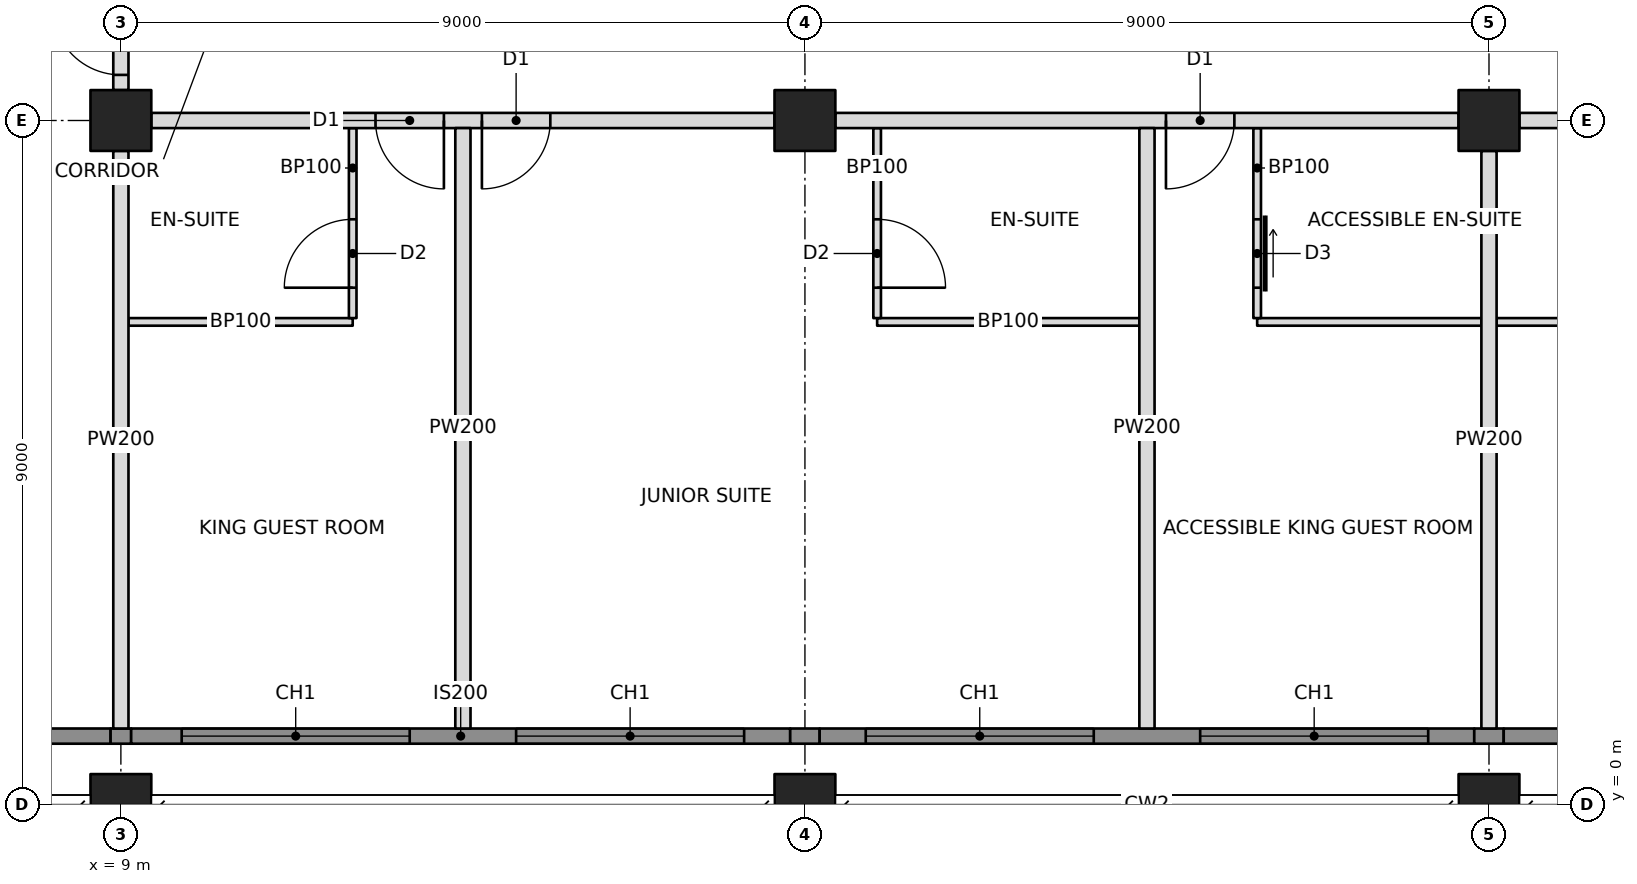
"""IFC4 building model, lengths in metres.
Left out: names, types, materials, properties, quantities, classifications, styles, units other than length and angle.
Written with IfcOpenShell. Run it as: python <this file> out.ifc"""

import sys

from ifc_helpers import new_model, si_unit, direction, frame, frame_2d, origin, origin_2d, place, context, subcontext, project, spatial, rectangle, hollow_rectangle, extrude, element, fill, save


model = new_model("IFC4")
c1 = context("Model", 3, precision=1e-05, world=origin(), true_north=direction((0.0, 1.0)))
c2 = subcontext(c1, "Body", "Model", "MODEL_VIEW")
j1 = project(units=[si_unit("LENGTHUNIT", "METRE"), si_unit("PLANEANGLEUNIT", "RADIAN")], contexts=[c1])
p1 = place(None, origin())
s1 = spatial("IfcSite", under=j1, at=p1, CompositionType="ELEMENT")
p2 = place(p1, origin())
s2 = spatial("IfcBuilding", under=s1, at=p2, CompositionType="ELEMENT")
p3 = place(p2, frame((0.0, 0.0, 233.8)))
s3 = spatial("IfcBuildingStorey", under=s2, at=p3, CompositionType="ELEMENT", Elevation=233.8)
p4 = place(p3, frame((9.0, 0.0, 0.0), z_axis=(0.0, 0.0, 1.0), x_axis=(1.0, 0.0, 0.0)))
e1 = element("IfcColumn", 1, at=p4, inside=s3, PredefinedType="COLUMN", context=c2, shape_type="SweptSolid", body=[
    extrude(hollow_rectangle(XDim=0.8, YDim=0.8, WallThickness=0.05, at=origin_2d()), origin(), (0.0, 0.0, 1.0), 3.6),
])
p5 = place(p3, frame((9.0, 9.0, 0.0), z_axis=(0.0, 0.0, 1.0), x_axis=(1.0, 0.0, 0.0)))
e2 = element("IfcColumn", 2, at=p5, inside=s3, PredefinedType="COLUMN", context=c2, shape_type="SweptSolid", body=[
    extrude(hollow_rectangle(XDim=0.8, YDim=0.8, WallThickness=0.04, at=origin_2d()), origin(), (0.0, 0.0, 1.0), 3.6),
])
p6 = place(p3, frame((18.0, 0.0, 0.0), z_axis=(0.0, 0.0, 1.0), x_axis=(1.0, 0.0, 0.0)))
e3 = element("IfcColumn", 3, at=p6, inside=s3, PredefinedType="COLUMN", context=c2, shape_type="SweptSolid", body=[
    extrude(hollow_rectangle(XDim=0.8, YDim=0.8, WallThickness=0.05, at=origin_2d()), origin(), (0.0, 0.0, 1.0), 3.6),
])
p7 = place(p3, frame((18.0, 9.0, 0.0), z_axis=(0.0, 0.0, 1.0), x_axis=(1.0, 0.0, 0.0)))
e4 = element("IfcColumn", 4, at=p7, inside=s3, PredefinedType="COLUMN", context=c2, shape_type="SweptSolid", body=[
    extrude(hollow_rectangle(XDim=0.8, YDim=0.8, WallThickness=0.04, at=origin_2d()), origin(), (0.0, 0.0, 1.0), 3.6),
])
p8 = place(p3, frame((27.0, 0.0, 0.0), z_axis=(0.0, 0.0, 1.0), x_axis=(1.0, 0.0, 0.0)))
e5 = element("IfcColumn", 5, at=p8, inside=s3, PredefinedType="COLUMN", context=c2, shape_type="SweptSolid", body=[
    extrude(hollow_rectangle(XDim=0.8, YDim=0.8, WallThickness=0.05, at=origin_2d()), origin(), (0.0, 0.0, 1.0), 3.6),
])
p9 = place(p3, frame((27.0, 9.0, 0.0), z_axis=(0.0, 0.0, 1.0), x_axis=(1.0, 0.0, 0.0)))
e6 = element("IfcColumn", 6, at=p9, inside=s3, PredefinedType="COLUMN", context=c2, shape_type="SweptSolid", body=[
    extrude(hollow_rectangle(XDim=0.8, YDim=0.8, WallThickness=0.04, at=origin_2d()), origin(), (0.0, 0.0, 1.0), 3.6),
])
p10 = place(p3, frame((3.0, 0.9, 0.0), z_axis=(0.0, 0.0, 1.0), x_axis=(1.0, 0.0, 0.0)))
e7 = element("IfcWall", 7, at=p10, inside=s3, PredefinedType="SOLIDWALL", context=c2, shape_type="SweptSolid", body=[
    extrude(rectangle(XDim=5.865, YDim=0.2, at=frame_2d((2.932, 0.0))), origin(), (0.0, 0.0, 1.0), 3.4),
])
p11 = place(p10, frame((1.45, 0.0, 0.6)))
e8 = element("IfcOpeningElement", 8, at=p11, cuts=e7, PredefinedType="OPENING", context=c2, shape_type="SweptSolid", body=[
    extrude(rectangle(XDim=3.0, YDim=2.2, at=frame_2d((1.5, 1.1))), frame((0.0, 0.11, 0.0), z_axis=(0.0, -1.0, 0.0), x_axis=(1.0, 0.0, 0.0)), (0.0, 0.0, 1.0), 0.22),
])
p12 = place(p3, frame((9.4, 9.0, 0.0), z_axis=(0.0, 0.0, 1.0), x_axis=(1.0, 0.0, 0.0)))
e9 = element("IfcWall", 9, at=p12, inside=s3, PredefinedType="PARTITIONING", context=c2, shape_type="SweptSolid", body=[
    extrude(rectangle(XDim=8.2, YDim=0.2, at=frame_2d((4.1, 0.0))), origin(), (0.0, 0.0, 1.0), 2.605),
])
p13 = place(p12, frame((2.95, 0.0, 0.0)))
e10 = element("IfcOpeningElement", 10, at=p13, cuts=e9, PredefinedType="OPENING", context=c2, shape_type="SweptSolid", body=[
    extrude(rectangle(XDim=0.9, YDim=2.1, at=frame_2d((0.45, 1.05))), frame((0.0, 0.11, 0.0), z_axis=(0.0, -1.0, 0.0), x_axis=(1.0, 0.0, 0.0)), (0.0, 0.0, 1.0), 0.22),
])
p14 = place(p12, frame((4.35, 0.0, 0.0)))
e11 = element("IfcOpeningElement", 11, at=p14, cuts=e9, PredefinedType="OPENING", context=c2, shape_type="SweptSolid", body=[
    extrude(rectangle(XDim=0.9, YDim=2.1, at=frame_2d((0.45, 1.05))), frame((0.0, 0.11, 0.0), z_axis=(0.0, -1.0, 0.0), x_axis=(1.0, 0.0, 0.0)), (0.0, 0.0, 1.0), 0.22),
])
p15 = place(p3, frame((18.4, 9.0, 0.0), z_axis=(0.0, 0.0, 1.0), x_axis=(1.0, 0.0, 0.0)))
e12 = element("IfcWall", 12, at=p15, inside=s3, PredefinedType="PARTITIONING", context=c2, shape_type="SweptSolid", body=[
    extrude(rectangle(XDim=8.2, YDim=0.2, at=frame_2d((4.1, 0.0))), origin(), (0.0, 0.0, 1.0), 2.605),
])
p16 = place(p15, frame((4.35, 0.0, 0.0)))
e13 = element("IfcOpeningElement", 13, at=p16, cuts=e12, PredefinedType="OPENING", context=c2, shape_type="SweptSolid", body=[
    extrude(rectangle(XDim=0.9, YDim=2.1, at=frame_2d((0.45, 1.05))), frame((0.0, 0.11, 0.0), z_axis=(0.0, -1.0, 0.0), x_axis=(1.0, 0.0, 0.0)), (0.0, 0.0, 1.0), 0.22),
])
p17 = place(p3, frame((27.4, 9.0, 0.0), z_axis=(0.0, 0.0, 1.0), x_axis=(1.0, 0.0, 0.0)))
e14 = element("IfcWall", 14, at=p17, inside=s3, PredefinedType="PARTITIONING", context=c2, shape_type="SweptSolid", body=[
    extrude(rectangle(XDim=8.368, YDim=0.2, at=frame_2d((4.184, 0.0))), origin(), (0.0, 0.0, 1.0), 2.605),
])
p18 = place(p17, frame((7.25, 0.0, 0.0)))
e15 = element("IfcOpeningElement", 15, at=p18, cuts=e14, PredefinedType="OPENING", context=c2, shape_type="SweptSolid", body=[
    extrude(rectangle(XDim=0.9, YDim=2.1, at=frame_2d((0.45, 1.05))), frame((0.0, 0.11, 0.0), z_axis=(0.0, -1.0, 0.0), x_axis=(1.0, 0.0, 0.0)), (0.0, 0.0, 1.0), 0.22),
])
p19 = place(p3, frame((9.0, 8.6, 0.0), z_axis=(0.0, 0.0, 1.0), x_axis=(0.0, -1.0, 0.0)))
e16 = element("IfcWall", 16, at=p19, inside=s3, PredefinedType="PARTITIONING", context=c2, shape_type="SweptSolid", body=[
    extrude(rectangle(XDim=7.6, YDim=0.2, at=frame_2d((3.8, 0.0))), origin(), (0.0, 0.0, 1.0), 2.638),
])
for number, where, z_axis, x_axis in (
    (17, (13.5, 8.9, 0.0), (0.0, 0.0, 1.0), (0.0, -1.0, 0.0)),
    (18, (22.5, 8.9, 0.0), (0.0, 0.0, 1.0), (0.0, -1.0, 0.0)),
):
    element("IfcWall", number, at=place(p3, frame(where, z_axis=z_axis, x_axis=x_axis)), inside=s3, PredefinedType="PARTITIONING", context=c2, shape_type="SweptSolid", body=[
        extrude(rectangle(XDim=7.9, YDim=0.2, at=frame_2d((3.95, 0.0))), origin(), (0.0, 0.0, 1.0), 2.604),
    ])
p20 = place(p3, frame((27.0, 8.6, 0.0), z_axis=(0.0, 0.0, 1.0), x_axis=(0.0, -1.0, 0.0)))
e19 = element("IfcWall", 19, at=p20, inside=s3, PredefinedType="PARTITIONING", context=c2, shape_type="SweptSolid", body=[
    extrude(rectangle(XDim=7.6, YDim=0.2, at=frame_2d((3.8, 0.0))), origin(), (0.0, 0.0, 1.0), 2.605),
])
p21 = place(p3, frame((9.1, 6.35, 0.0), z_axis=(0.0, 0.0, 1.0), x_axis=(1.0, 0.0, 0.0)))
e20 = element("IfcWall", 20, at=p21, inside=s3, PredefinedType="PARTITIONING", context=c2, shape_type="SweptSolid", body=[
    extrude(rectangle(XDim=2.95, YDim=0.1, at=frame_2d((1.475, 0.0))), origin(), (0.0, 0.0, 1.0), 2.638),
])
p22 = place(p3, frame((12.05, 8.9, 0.0), z_axis=(0.0, 0.0, 1.0), x_axis=(0.0, -1.0, 0.0)))
e21 = element("IfcWall", 21, at=p22, inside=s3, PredefinedType="PARTITIONING", context=c2, shape_type="SweptSolid", body=[
    extrude(rectangle(XDim=2.5, YDim=0.1, at=frame_2d((1.25, 0.0))), origin(), (0.0, 0.0, 1.0), 2.604),
])
p23 = place(p22, frame((1.2, 0.0, 0.0)))
e22 = element("IfcOpeningElement", 22, at=p23, cuts=e21, PredefinedType="OPENING", context=c2, shape_type="SweptSolid", body=[
    extrude(rectangle(XDim=0.9, YDim=2.1, at=frame_2d((0.45, 1.05))), frame((0.0, 0.06, 0.0), z_axis=(0.0, -1.0, 0.0), x_axis=(1.0, 0.0, 0.0)), (0.0, 0.0, 1.0), 0.12),
])
p24 = place(p3, frame((18.95, 6.35, 0.0), z_axis=(0.0, 0.0, 1.0), x_axis=(1.0, 0.0, 0.0)))
e23 = element("IfcWall", 23, at=p24, inside=s3, PredefinedType="PARTITIONING", context=c2, shape_type="SweptSolid", body=[
    extrude(rectangle(XDim=3.45, YDim=0.1, at=frame_2d((1.725, 0.0))), origin(), (0.0, 0.0, 1.0), 3.4),
])
p25 = place(p3, frame((18.95, 8.9, 0.0), z_axis=(0.0, 0.0, 1.0), x_axis=(0.0, -1.0, 0.0)))
e24 = element("IfcWall", 24, at=p25, inside=s3, PredefinedType="PARTITIONING", context=c2, shape_type="SweptSolid", body=[
    extrude(rectangle(XDim=2.5, YDim=0.1, at=frame_2d((1.25, 0.0))), origin(), (0.0, 0.0, 1.0), 2.604),
])
p26 = place(p25, frame((1.2, 0.0, 0.0)))
e25 = element("IfcOpeningElement", 25, at=p26, cuts=e24, PredefinedType="OPENING", context=c2, shape_type="SweptSolid", body=[
    extrude(rectangle(XDim=0.9, YDim=2.1, at=frame_2d((0.45, 1.05))), frame((0.0, 0.06, 0.0), z_axis=(0.0, -1.0, 0.0), x_axis=(1.0, 0.0, 0.0)), (0.0, 0.0, 1.0), 0.12),
])
p27 = place(p3, frame((23.95, 6.35, 0.0), z_axis=(0.0, 0.0, 1.0), x_axis=(1.0, 0.0, 0.0)))
e26 = element("IfcWall", 26, at=p27, inside=s3, PredefinedType="PARTITIONING", context=c2, shape_type="SweptSolid", body=[
    extrude(rectangle(XDim=2.95, YDim=0.1, at=frame_2d((1.475, 0.0))), origin(), (0.0, 0.0, 1.0), 2.604),
])
p28 = place(p3, frame((23.95, 8.9, 0.0), z_axis=(0.0, 0.0, 1.0), x_axis=(0.0, -1.0, 0.0)))
e27 = element("IfcWall", 27, at=p28, inside=s3, PredefinedType="PARTITIONING", context=c2, shape_type="SweptSolid", body=[
    extrude(rectangle(XDim=2.5, YDim=0.1, at=frame_2d((1.25, 0.0))), origin(), (0.0, 0.0, 1.0), 2.604),
])
p29 = place(p28, frame((1.2, 0.0, 0.0)))
e28 = element("IfcOpeningElement", 28, at=p29, cuts=e27, PredefinedType="OPENING", context=c2, shape_type="SweptSolid", body=[
    extrude(rectangle(XDim=0.9, YDim=2.1, at=frame_2d((0.45, 1.05))), frame((0.0, 0.06, 0.0), z_axis=(0.0, -1.0, 0.0), x_axis=(1.0, 0.0, 0.0)), (0.0, 0.0, 1.0), 0.12),
])
p30 = place(p3, frame((27.1, 6.35, 0.0), z_axis=(0.0, 0.0, 1.0), x_axis=(1.0, 0.0, 0.0)))
e29 = element("IfcWall", 29, at=p30, inside=s3, PredefinedType="PARTITIONING", context=c2, shape_type="SweptSolid", body=[
    extrude(rectangle(XDim=3.45, YDim=0.1, at=frame_2d((1.725, 0.0))), origin(), (0.0, 0.0, 1.0), 2.604),
])
p31 = place(p3, frame((9.0, 9.4, 0.0), z_axis=(0.0, 0.0, 1.0), x_axis=(0.0, 1.0, 0.0)))
e30 = element("IfcWall", 30, at=p31, inside=s3, PredefinedType="PARTITIONING", context=c2, shape_type="SweptSolid", body=[
    extrude(rectangle(XDim=1.3, YDim=0.2, at=frame_2d((0.65, 0.0))), origin(), (0.0, 0.0, 1.0), 2.605),
])
p32 = place(p31, frame((0.2, 0.0, 0.0)))
e31 = element("IfcOpeningElement", 31, at=p32, cuts=e30, PredefinedType="OPENING", context=c2, shape_type="SweptSolid", body=[
    extrude(rectangle(XDim=0.9, YDim=2.1, at=frame_2d((0.45, 1.05))), frame((0.0, 0.11, 0.0), z_axis=(0.0, -1.0, 0.0), x_axis=(1.0, 0.0, 0.0)), (0.0, 0.0, 1.0), 0.22),
])
p33 = place(p3, frame((8.865, 0.9, 0.0), z_axis=(0.0, 0.0, 1.0), x_axis=(1.0, 0.0, 0.0)))
e32 = element("IfcWall", 32, at=p33, inside=s3, PredefinedType="SOLIDWALL", context=c2, shape_type="SweptSolid", body=[
    extrude(rectangle(XDim=0.271, YDim=0.2, at=frame_2d((0.135, 0.0))), origin(), (0.0, 0.0, 1.0), 2.638),
])
p34 = place(p3, frame((9.135, 0.9, 0.0), z_axis=(0.0, 0.0, 1.0), x_axis=(1.0, 0.0, 0.0)))
e33 = element("IfcWall", 33, at=p34, inside=s3, PredefinedType="SOLIDWALL", context=c2, shape_type="SweptSolid", body=[
    extrude(rectangle(XDim=8.671, YDim=0.2, at=frame_2d((4.335, 0.0))), origin(), (0.0, 0.0, 1.0), 3.4),
])
p35 = place(p34, frame((0.665, 0.0, 0.6)))
e34 = element("IfcOpeningElement", 34, at=p35, cuts=e33, PredefinedType="OPENING", context=c2, shape_type="SweptSolid", body=[
    extrude(rectangle(XDim=3.0, YDim=2.2, at=frame_2d((1.5, 1.1))), frame((0.0, 0.11, 0.0), z_axis=(0.0, -1.0, 0.0), x_axis=(1.0, 0.0, 0.0)), (0.0, 0.0, 1.0), 0.22),
])
p36 = place(p34, frame((5.065, 0.0, 0.6)))
e35 = element("IfcOpeningElement", 35, at=p36, cuts=e33, PredefinedType="OPENING", context=c2, shape_type="SweptSolid", body=[
    extrude(rectangle(XDim=3.0, YDim=2.2, at=frame_2d((1.5, 1.1))), frame((0.0, 0.11, 0.0), z_axis=(0.0, -1.0, 0.0), x_axis=(1.0, 0.0, 0.0)), (0.0, 0.0, 1.0), 0.22),
])
p37 = place(p3, frame((17.806, 0.9, 0.0), z_axis=(0.0, 0.0, 1.0), x_axis=(1.0, 0.0, 0.0)))
e36 = element("IfcWall", 36, at=p37, inside=s3, PredefinedType="SOLIDWALL", context=c2, shape_type="SweptSolid", body=[
    extrude(rectangle(XDim=0.388, YDim=0.2, at=frame_2d((0.194, 0.0))), origin(), (0.0, 0.0, 1.0), 2.604),
])
p38 = place(p3, frame((18.194, 0.9, 0.0), z_axis=(0.0, 0.0, 1.0), x_axis=(1.0, 0.0, 0.0)))
e37 = element("IfcWall", 37, at=p38, inside=s3, PredefinedType="SOLIDWALL", context=c2, shape_type="SweptSolid", body=[
    extrude(rectangle(XDim=8.612, YDim=0.2, at=frame_2d((4.306, 0.0))), origin(), (0.0, 0.0, 1.0), 3.4),
])
p39 = place(p38, frame((0.606, 0.0, 0.6)))
e38 = element("IfcOpeningElement", 38, at=p39, cuts=e37, PredefinedType="OPENING", context=c2, shape_type="SweptSolid", body=[
    extrude(rectangle(XDim=3.0, YDim=2.2, at=frame_2d((1.5, 1.1))), frame((0.0, 0.11, 0.0), z_axis=(0.0, -1.0, 0.0), x_axis=(1.0, 0.0, 0.0)), (0.0, 0.0, 1.0), 0.22),
])
p40 = place(p38, frame((5.006, 0.0, 0.6)))
e39 = element("IfcOpeningElement", 39, at=p40, cuts=e37, PredefinedType="OPENING", context=c2, shape_type="SweptSolid", body=[
    extrude(rectangle(XDim=3.0, YDim=2.2, at=frame_2d((1.5, 1.1))), frame((0.0, 0.11, 0.0), z_axis=(0.0, -1.0, 0.0), x_axis=(1.0, 0.0, 0.0)), (0.0, 0.0, 1.0), 0.22),
])
p41 = place(p3, frame((26.806, 0.9, 0.0), z_axis=(0.0, 0.0, 1.0), x_axis=(1.0, 0.0, 0.0)))
e40 = element("IfcWall", 40, at=p41, inside=s3, PredefinedType="SOLIDWALL", context=c2, shape_type="SweptSolid", body=[
    extrude(rectangle(XDim=0.388, YDim=0.2, at=frame_2d((0.194, 0.0))), origin(), (0.0, 0.0, 1.0), 2.604),
])
p42 = place(p3, frame((27.194, 0.9, 0.0), z_axis=(0.0, 0.0, 1.0), x_axis=(1.0, 0.0, 0.0)))
e41 = element("IfcWall", 41, at=p42, inside=s3, PredefinedType="SOLIDWALL", context=c2, shape_type="SweptSolid", body=[
    extrude(rectangle(XDim=5.806, YDim=0.2, at=frame_2d((2.903, 0.0))), origin(), (0.0, 0.0, 1.0), 3.4),
])
p43 = place(p42, frame((1.356, 0.0, 0.6)))
e42 = element("IfcOpeningElement", 42, at=p43, cuts=e41, PredefinedType="OPENING", context=c2, shape_type="SweptSolid", body=[
    extrude(rectangle(XDim=3.0, YDim=2.2, at=frame_2d((1.5, 1.1))), frame((0.0, 0.11, 0.0), z_axis=(0.0, -1.0, 0.0), x_axis=(1.0, 0.0, 0.0)), (0.0, 0.0, 1.0), 0.22),
])
p44 = place(p35, origin())
e43 = element("IfcWindow", 43, at=p44, inside=s3, PartitioningType="TRIPLE_PANEL_VERTICAL", PredefinedType="WINDOW", context=c2, shape_type="SweptSolid", body=[
    extrude(rectangle(XDim=3.0, YDim=2.2, at=frame_2d((1.5, 1.1))), frame((0.0, 0.03, 0.0), z_axis=(0.0, -1.0, 0.0), x_axis=(1.0, 0.0, 0.0)), (0.0, 0.0, 1.0), 0.06),
])
fill(e34, e43)
p45 = place(p36, origin())
e44 = element("IfcWindow", 44, at=p45, inside=s3, PartitioningType="TRIPLE_PANEL_VERTICAL", PredefinedType="WINDOW", context=c2, shape_type="SweptSolid", body=[
    extrude(rectangle(XDim=3.0, YDim=2.2, at=frame_2d((1.5, 1.1))), frame((0.0, 0.03, 0.0), z_axis=(0.0, -1.0, 0.0), x_axis=(1.0, 0.0, 0.0)), (0.0, 0.0, 1.0), 0.06),
])
fill(e35, e44)
p46 = place(p39, origin())
e45 = element("IfcWindow", 45, at=p46, inside=s3, PartitioningType="TRIPLE_PANEL_VERTICAL", PredefinedType="WINDOW", context=c2, shape_type="SweptSolid", body=[
    extrude(rectangle(XDim=3.0, YDim=2.2, at=frame_2d((1.5, 1.1))), frame((0.0, 0.03, 0.0), z_axis=(0.0, -1.0, 0.0), x_axis=(1.0, 0.0, 0.0)), (0.0, 0.0, 1.0), 0.06),
])
fill(e38, e45)
p47 = place(p40, origin())
e46 = element("IfcWindow", 46, at=p47, inside=s3, PartitioningType="TRIPLE_PANEL_VERTICAL", PredefinedType="WINDOW", context=c2, shape_type="SweptSolid", body=[
    extrude(rectangle(XDim=3.0, YDim=2.2, at=frame_2d((1.5, 1.1))), frame((0.0, 0.03, 0.0), z_axis=(0.0, -1.0, 0.0), x_axis=(1.0, 0.0, 0.0)), (0.0, 0.0, 1.0), 0.06),
])
fill(e39, e46)
p48 = place(p23, frame((0.9, 0.0, 0.0), z_axis=(0.0, 0.0, 1.0), x_axis=(-1.0, 0.0, 0.0)))
e47 = element("IfcDoor", 47, at=p48, inside=s3, OperationType="SINGLE_SWING_LEFT", PredefinedType="DOOR", context=c2, shape_type="SweptSolid", body=[
    extrude(rectangle(XDim=0.9, YDim=2.1, at=frame_2d((0.45, 1.05))), frame((0.0, 0.025, 0.0), z_axis=(0.0, -1.0, 0.0), x_axis=(1.0, 0.0, 0.0)), (0.0, 0.0, 1.0), 0.05),
])
fill(e22, e47)
p49 = place(p13, frame((0.9, 0.0, 0.0), z_axis=(0.0, 0.0, 1.0), x_axis=(-1.0, 0.0, 0.0)))
e48 = element("IfcDoor", 48, at=p49, inside=s3, OperationType="SINGLE_SWING_LEFT", PredefinedType="DOOR", context=c2, shape_type="SweptSolid", body=[
    extrude(rectangle(XDim=0.9, YDim=2.1, at=frame_2d((0.45, 1.05))), frame((0.0, 0.025, 0.0), z_axis=(0.0, -1.0, 0.0), x_axis=(1.0, 0.0, 0.0)), (0.0, 0.0, 1.0), 0.05),
])
fill(e10, e48)
p50 = place(p26, origin())
e49 = element("IfcDoor", 49, at=p50, inside=s3, OperationType="SINGLE_SWING_RIGHT", PredefinedType="DOOR", context=c2, shape_type="SweptSolid", body=[
    extrude(rectangle(XDim=0.9, YDim=2.1, at=frame_2d((0.45, 1.05))), frame((0.0, 0.025, 0.0), z_axis=(0.0, -1.0, 0.0), x_axis=(1.0, 0.0, 0.0)), (0.0, 0.0, 1.0), 0.05),
])
fill(e25, e49)
p51 = place(p14, frame((0.9, 0.0, 0.0), z_axis=(0.0, 0.0, 1.0), x_axis=(-1.0, 0.0, 0.0)))
e50 = element("IfcDoor", 50, at=p51, inside=s3, OperationType="SINGLE_SWING_RIGHT", PredefinedType="DOOR", context=c2, shape_type="SweptSolid", body=[
    extrude(rectangle(XDim=0.9, YDim=2.1, at=frame_2d((0.45, 1.05))), frame((0.0, 0.025, 0.0), z_axis=(0.0, -1.0, 0.0), x_axis=(1.0, 0.0, 0.0)), (0.0, 0.0, 1.0), 0.05),
])
fill(e11, e50)
p52 = place(p29, origin())
e51 = element("IfcDoor", 51, at=p52, inside=s3, OperationType="SLIDING_TO_LEFT", PredefinedType="DOOR", context=c2, shape_type="SweptSolid", body=[
    extrude(rectangle(XDim=0.9, YDim=2.1, at=frame_2d((0.45, 1.05))), frame((0.0, 0.025, 0.0), z_axis=(0.0, -1.0, 0.0), x_axis=(1.0, 0.0, 0.0)), (0.0, 0.0, 1.0), 0.05),
])
fill(e28, e51)
p53 = place(p16, frame((0.9, 0.0, 0.0), z_axis=(0.0, 0.0, 1.0), x_axis=(-1.0, 0.0, 0.0)))
e52 = element("IfcDoor", 52, at=p53, inside=s3, OperationType="SINGLE_SWING_RIGHT", PredefinedType="DOOR", context=c2, shape_type="SweptSolid", body=[
    extrude(rectangle(XDim=0.9, YDim=2.1, at=frame_2d((0.45, 1.05))), frame((0.0, 0.025, 0.0), z_axis=(0.0, -1.0, 0.0), x_axis=(1.0, 0.0, 0.0)), (0.0, 0.0, 1.0), 0.05),
])
fill(e13, e52)
p54 = place(p32, origin())
e53 = element("IfcDoor", 53, at=p54, inside=s3, OperationType="SINGLE_SWING_RIGHT", PredefinedType="DOOR", context=c2, shape_type="SweptSolid", body=[
    extrude(rectangle(XDim=0.9, YDim=2.1, at=frame_2d((0.45, 1.05))), frame((0.0, 0.025, 0.0), z_axis=(0.0, -1.0, 0.0), x_axis=(1.0, 0.0, 0.0)), (0.0, 0.0, 1.0), 0.05),
])
fill(e31, e53)
save(model, sys.argv[1])
